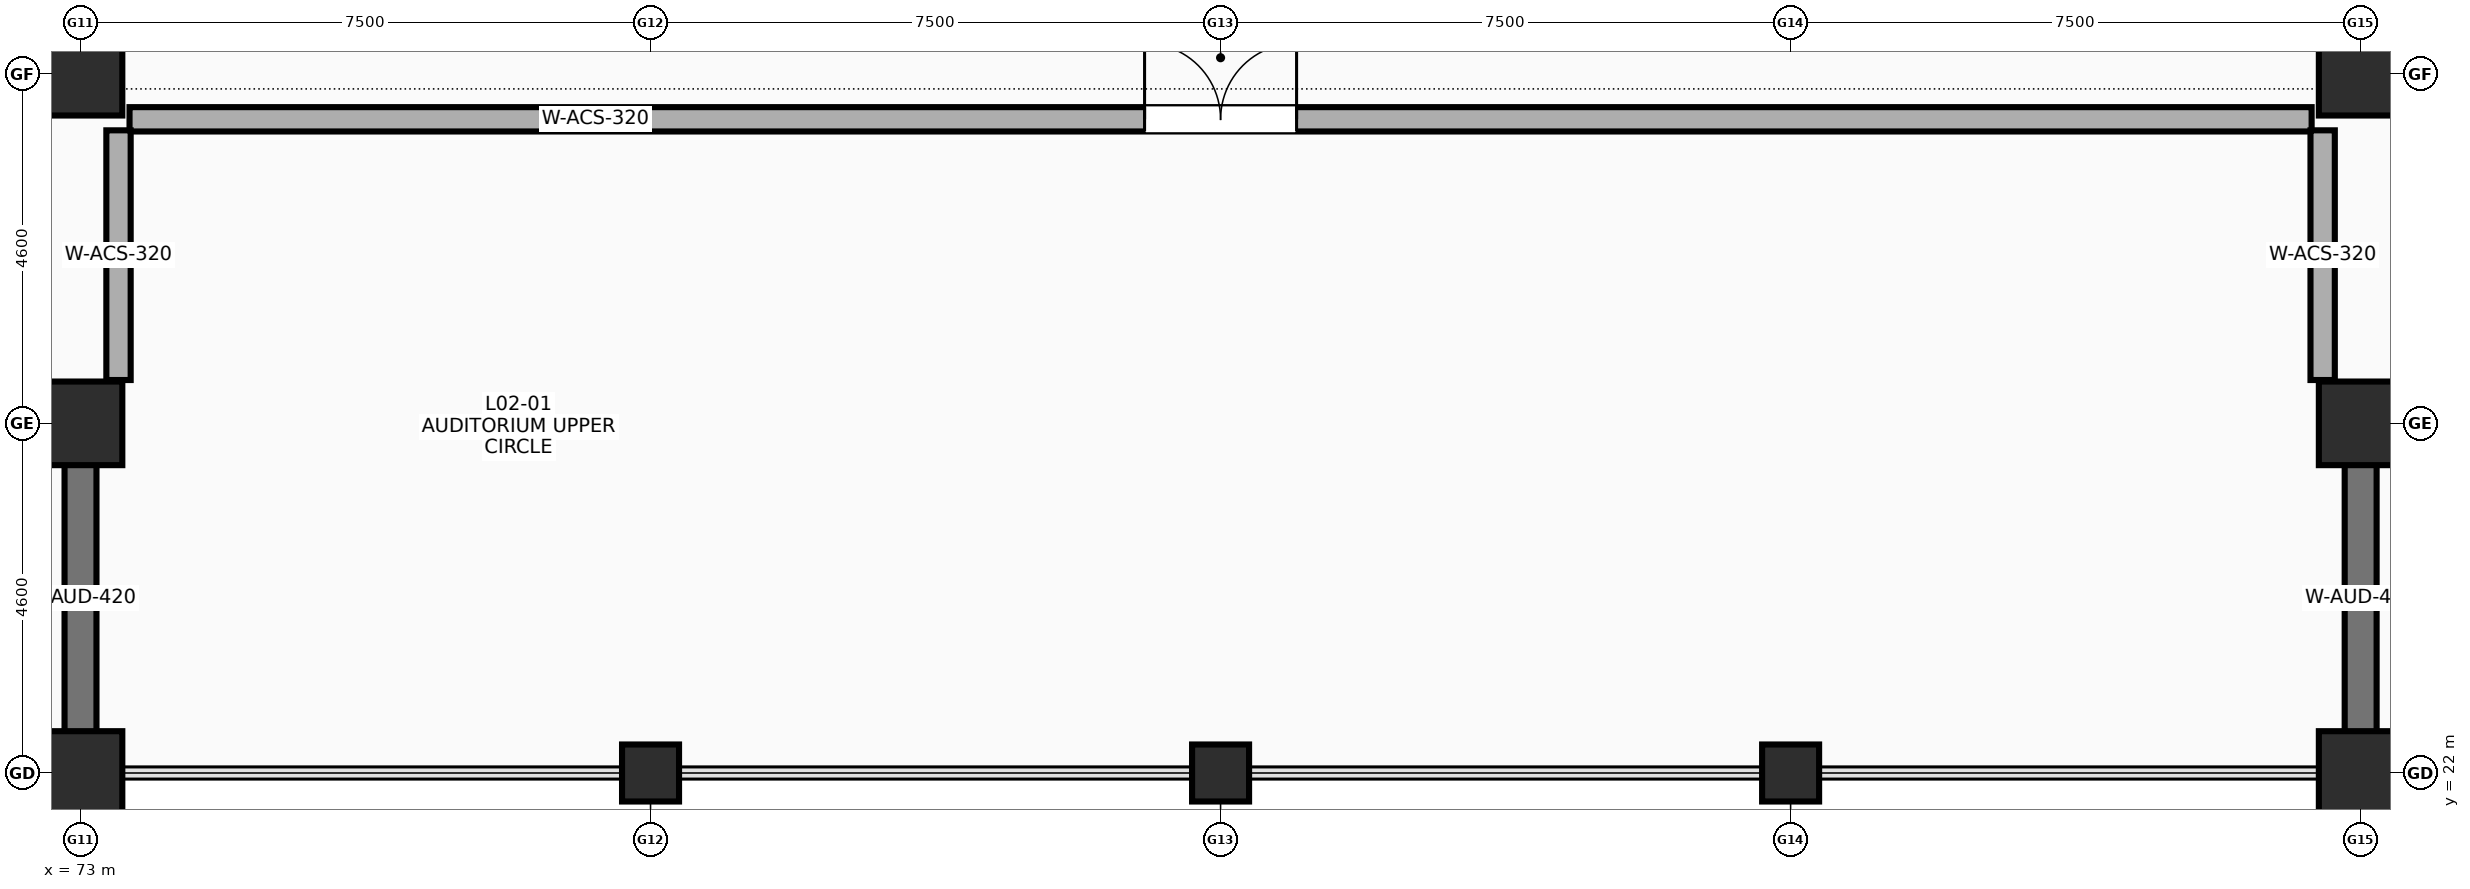
"""IFC4 building model, lengths in metres.
Left out: names, types, materials, properties, quantities, classifications, styles, units other than length and angle.
Written with IfcOpenShell. Run it as: python <this file> out.ifc"""

import sys

from ifc_helpers import new_model, si_unit, direction, frame, frame_2d, origin, origin_2d, place, context, subcontext, project, spatial, rectangle, extrude, element, fill, save


model = new_model("IFC4")
c1 = context("Model", 3, precision=1e-05, world=origin(), true_north=direction((0.0, 1.0)))
c2 = subcontext(c1, "Body", "Model", "MODEL_VIEW")
j1 = project(units=[si_unit("LENGTHUNIT", "METRE"), si_unit("PLANEANGLEUNIT", "RADIAN")], contexts=[c1])
p1 = place(None, origin())
s1 = spatial("IfcSite", under=j1, at=p1, CompositionType="ELEMENT")
p2 = place(p1, origin())
s2 = spatial("IfcBuilding", under=s1, at=p2, CompositionType="ELEMENT")
p3 = place(p2, frame((0.0, 0.0, 9.8)))
s3 = spatial("IfcBuildingStorey", under=s2, at=p3, CompositionType="ELEMENT", Elevation=9.8)
for number, where, z_axis, x_axis in (
    (1, (73.0, 22.0, 0.0), (0.0, 0.0, 1.0), (1.0, 0.0, 0.0)),
    (2, (73.0, 26.6, 0.0), (0.0, 0.0, 1.0), (1.0, 0.0, 0.0)),
    (3, (73.0, 31.2, 0.0), (0.0, 0.0, 1.0), (1.0, 0.0, 0.0)),
):
    element("IfcColumn", number, at=place(p3, frame(where, z_axis=z_axis, x_axis=x_axis)), inside=s3, PredefinedType="COLUMN", context=c2, shape_type="SweptSolid", body=[
        extrude(rectangle(XDim=1.1, YDim=1.1, at=origin_2d()), origin(), (0.0, 0.0, 1.0), 4.4),
    ])
for number, where, z_axis, x_axis in (
    (4, (80.5, 22.0, 0.0), (0.0, 0.0, 1.0), (1.0, 0.0, 0.0)),
    (5, (88.0, 22.0, 0.0), (0.0, 0.0, 1.0), (1.0, 0.0, 0.0)),
    (6, (95.5, 22.0, 0.0), (0.0, 0.0, 1.0), (1.0, 0.0, 0.0)),
):
    element("IfcColumn", number, at=place(p3, frame(where, z_axis=z_axis, x_axis=x_axis)), inside=s3, PredefinedType="COLUMN", context=c2, shape_type="SweptSolid", body=[
        extrude(rectangle(XDim=0.75, YDim=0.75, at=origin_2d()), origin(), (0.0, 0.0, 1.0), 4.4),
    ])
for number, where, z_axis, x_axis in (
    (7, (103.0, 22.0, 0.0), (0.0, 0.0, 1.0), (1.0, 0.0, 0.0)),
    (8, (103.0, 26.6, 0.0), (0.0, 0.0, 1.0), (1.0, 0.0, 0.0)),
    (9, (103.0, 31.2, 0.0), (0.0, 0.0, 1.0), (1.0, 0.0, 0.0)),
):
    element("IfcColumn", number, at=place(p3, frame(where, z_axis=z_axis, x_axis=x_axis)), inside=s3, PredefinedType="COLUMN", context=c2, shape_type="SweptSolid", body=[
        extrude(rectangle(XDim=1.1, YDim=1.1, at=origin_2d()), origin(), (0.0, 0.0, 1.0), 4.4),
    ])
for number, where, z_axis, x_axis in (
    (10, (73.0, 22.54, 0.0), (0.0, 0.0, 1.0), (0.0, 1.0, 0.0)),
    (11, (103.0, 22.54, 0.0), (0.0, 0.0, 1.0), (0.0, 1.0, 0.0)),
):
    element("IfcWall", number, at=place(p3, frame(where, z_axis=z_axis, x_axis=x_axis)), inside=s3, PredefinedType="SHEAR", context=c2, shape_type="SweptSolid", body=[
        extrude(rectangle(XDim=3.52, YDim=0.42, at=frame_2d((1.76, 0.0))), origin(), (0.0, 0.0, 1.0), 4.4),
    ])
p4 = place(p3, frame((73.645, 30.6, 0.0), z_axis=(0.0, 0.0, 1.0), x_axis=(1.0, 0.0, 0.0)))
e12 = element("IfcWall", 12, at=p4, inside=s3, PredefinedType="PARTITIONING", context=c2, shape_type="SweptSolid", body=[
    extrude(rectangle(XDim=28.71, YDim=0.32, at=frame_2d((14.355, 0.0))), origin(), (0.0, 0.0, 1.0), 4.1),
])
p5 = place(p4, frame((13.355, 0.0, 0.0)))
e13 = element("IfcOpeningElement", 13, at=p5, cuts=e12, PredefinedType="OPENING", context=c2, shape_type="SweptSolid", body=[
    extrude(rectangle(XDim=2.0, YDim=2.35, at=frame_2d((1.0, 1.175))), frame((0.0, 0.17, 0.0), z_axis=(0.0, -1.0, 0.0), x_axis=(1.0, 0.0, 0.0)), (0.0, 0.0, 1.0), 0.34),
])
for number, where, z_axis, x_axis in (
    (14, (73.5, 27.17, 0.0), (0.0, 0.0, 1.0), (0.0, 1.0, 0.0)),
    (15, (102.5, 27.17, 0.0), (0.0, 0.0, 1.0), (0.0, 1.0, 0.0)),
):
    element("IfcWall", number, at=place(p3, frame(where, z_axis=z_axis, x_axis=x_axis)), inside=s3, PredefinedType="PARTITIONING", context=c2, shape_type="SweptSolid", body=[
        extrude(rectangle(XDim=3.285, YDim=0.32, at=frame_2d((1.643, 0.0))), origin(), (0.0, 0.0, 1.0), 4.1),
    ])
p6 = place(p5, origin())
e16 = element("IfcDoor", 16, at=p6, inside=s3, OperationType="DOUBLE_DOOR_SINGLE_SWING", PredefinedType="DOOR", context=c2, shape_type="SweptSolid", body=[
    extrude(rectangle(XDim=2.0, YDim=2.35, at=frame_2d((1.0, 1.175))), frame((0.0, 0.025, 0.0), z_axis=(0.0, -1.0, 0.0), x_axis=(1.0, 0.0, 0.0)), (0.0, 0.0, 1.0), 0.05),
])
fill(e13, e16)
save(model, sys.argv[1])
